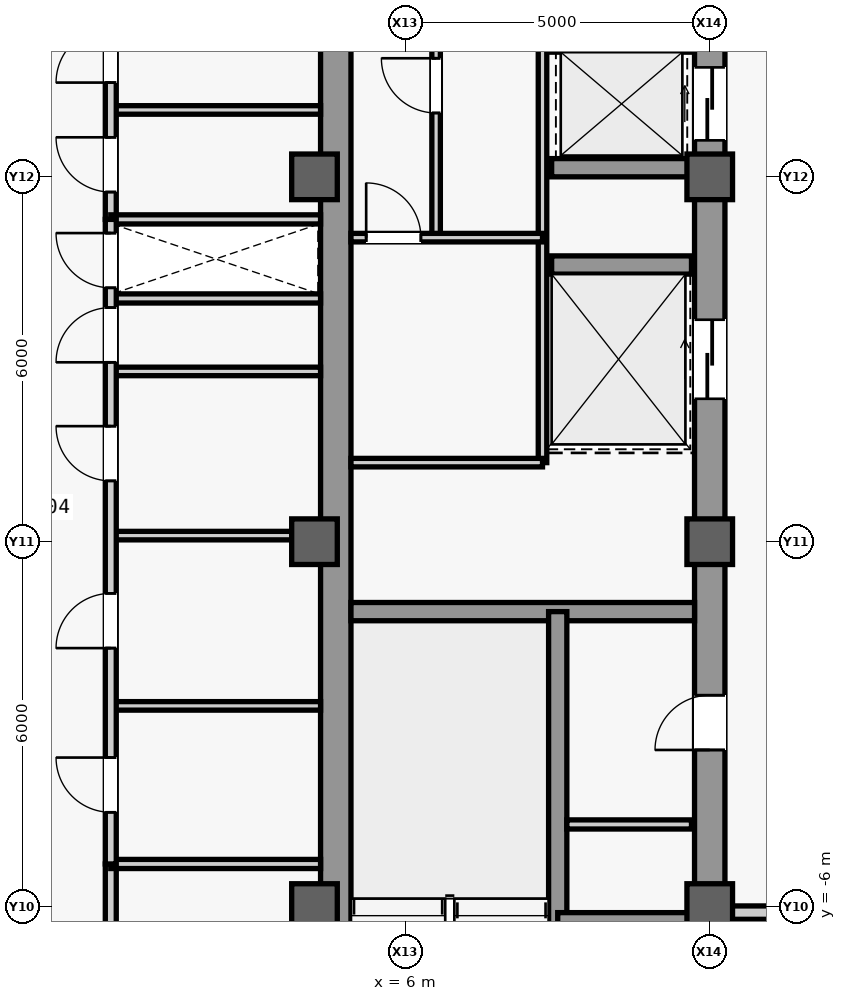
"""IFC4 building model, lengths in metres.
Left out: names, types, materials, properties, quantities, classifications, styles, units other than length and angle.
Written with IfcOpenShell. Run it as: python <this file> out.ifc"""

import sys

from ifc_helpers import new_model, si_unit, direction, frame, frame_2d, origin, origin_2d, place, context, subcontext, project, spatial, rectangle, extrude, source, transform, mapped, element, fill, save


model = new_model("IFC4")
c1 = context("Model", 3, precision=1e-05, world=origin(), true_north=direction((0.0, 1.0)))
c2 = subcontext(c1, "Body", "Model", "MODEL_VIEW")
j1 = project(units=[si_unit("LENGTHUNIT", "METRE"), si_unit("PLANEANGLEUNIT", "RADIAN")], contexts=[c1])
p1 = place(None, origin())
s1 = spatial("IfcSite", under=j1, at=p1, CompositionType="ELEMENT")
p2 = place(p1, origin())
s2 = spatial("IfcBuilding", under=s1, at=p2, CompositionType="ELEMENT")
p3 = place(p2, frame((0.0, 0.0, 289.5)))
s3 = spatial("IfcBuildingStorey", under=s2, at=p3, CompositionType="ELEMENT", Elevation=289.5)
m1 = source(origin(), c2, "Body", "SweptSolid", [
    extrude(rectangle(XDim=22.0, YDim=0.5, at=frame_2d((11.0, 0.0))), origin(), (0.0, 0.0, 1.0), 3.78),
])
p4 = place(p3, frame((11.0, -11.0, 0.0), z_axis=(0.0, 0.0, 1.0), x_axis=(0.0, 1.0, 0.0)))
e1 = element("IfcWall", 1, at=p4, inside=s3, PredefinedType="SHEAR", context=c2, shape_type="MappedRepresentation", body=[
    mapped(m1, transform((0.0, 0.0, 0.0), scale=1.0)),
])
m2 = source(origin(), c2, "Body", "SweptSolid", [
    extrude(rectangle(XDim=1.1, YDim=2.2, at=frame_2d((0.55, 1.1))), frame((0.0, 0.26, 0.0), z_axis=(0.0, -1.0, 0.0), x_axis=(1.0, 0.0, 0.0)), (0.0, 0.0, 1.0), 0.52),
])
p5 = place(p4, frame((0.8, 0.0, 0.0)))
e2 = element("IfcOpeningElement", 2, at=p5, cuts=e1, PredefinedType="OPENING", context=c2, shape_type="MappedRepresentation", body=[
    mapped(m2, transform((0.0, 0.0, 0.0), scale=1.0)),
])
m3 = source(origin(), c2, "Body", "SweptSolid", [
    extrude(rectangle(XDim=0.9, YDim=2.15, at=frame_2d((0.45, 1.075))), frame((0.0, 0.26, 0.0), z_axis=(0.0, -1.0, 0.0), x_axis=(1.0, 0.0, 0.0)), (0.0, 0.0, 1.0), 0.52),
])
p6 = place(p4, frame((7.575, 0.0, 0.0)))
e3 = element("IfcOpeningElement", 3, at=p6, cuts=e1, PredefinedType="OPENING", context=c2, shape_type="MappedRepresentation", body=[
    mapped(m3, transform((0.0, 0.0, 0.0), scale=1.0)),
])
m4 = source(origin(), c2, "Body", "SweptSolid", [
    extrude(rectangle(XDim=1.2, YDim=2.3, at=frame_2d((0.6, 1.15))), frame((0.0, 0.26, 0.0), z_axis=(0.0, -1.0, 0.0), x_axis=(1.0, 0.0, 0.0)), (0.0, 0.0, 1.0), 0.52),
])
p7 = place(p4, frame((17.6, 0.0, 0.0)))
e4 = element("IfcOpeningElement", 4, at=p7, cuts=e1, PredefinedType="OPENING", context=c2, shape_type="MappedRepresentation", body=[
    mapped(m4, transform((0.0, 0.0, 0.0), scale=1.0)),
])
p8 = place(p4, frame((19.6, 0.0, 0.0)))
e5 = element("IfcOpeningElement", 5, at=p8, cuts=e1, PredefinedType="OPENING", context=c2, shape_type="MappedRepresentation", body=[
    mapped(m4, transform((0.0, 0.0, 0.0), scale=1.0)),
])
m5 = source(origin(), c2, "Body", "SweptSolid", [
    extrude(rectangle(XDim=1.3, YDim=2.3, at=frame_2d((0.65, 1.15))), frame((0.0, 0.26, 0.0), z_axis=(0.0, -1.0, 0.0), x_axis=(1.0, 0.0, 0.0)), (0.0, 0.0, 1.0), 0.52),
])
p9 = place(p4, frame((2.7, 0.0, 0.0)))
e6 = element("IfcOpeningElement", 6, at=p9, cuts=e1, PredefinedType="OPENING", context=c2, shape_type="MappedRepresentation", body=[
    mapped(m5, transform((0.0, 0.0, 0.0), scale=1.0)),
])
p10 = place(p4, frame((13.35, 0.0, 0.0)))
e7 = element("IfcOpeningElement", 7, at=p10, cuts=e1, PredefinedType="OPENING", context=c2, shape_type="MappedRepresentation", body=[
    mapped(m5, transform((0.0, 0.0, 0.0), scale=1.0)),
])
m6 = source(origin(), c2, "Body", "SweptSolid", [
    extrude(rectangle(XDim=21.4, YDim=0.5, at=frame_2d((10.7, 0.0))), origin(), (0.0, 0.0, 1.0), 3.78),
])
p11 = place(p3, frame((4.85, -10.7, 0.0), z_axis=(0.0, 0.0, 1.0), x_axis=(0.0, 1.0, 0.0)))
e8 = element("IfcWall", 8, at=p11, inside=s3, PredefinedType="SHEAR", context=c2, shape_type="MappedRepresentation", body=[
    mapped(m6, transform((0.0, 0.0, 0.0), scale=1.0)),
])
m7 = source(origin(), c2, "Body", "SweptSolid", [
    extrude(rectangle(XDim=5.65, YDim=0.3, at=frame_2d((2.825, 0.0))), origin(), (0.0, 0.0, 1.0), 3.78),
])
p12 = place(p3, frame((5.1, -1.15, 0.0), z_axis=(0.0, 0.0, 1.0), x_axis=(1.0, 0.0, 0.0)))
e9 = element("IfcWall", 9, at=p12, inside=s3, PredefinedType="SHEAR", context=c2, shape_type="MappedRepresentation", body=[
    mapped(m7, transform((0.0, 0.0, 0.0), scale=1.0)),
])
m8 = source(origin(), c2, "Body", "SweptSolid", [
    extrude(rectangle(XDim=0.75, YDim=0.75, at=origin_2d()), origin(), (0.0, 0.0, 1.0), 4.0),
])
for number, where, z_axis, x_axis in (
    (10, (4.5, -6.0, 0.0), (0.0, 0.0, 1.0), (1.0, 0.0, 0.0)),
    (11, (4.5, 0.0, 0.0), (0.0, 0.0, 1.0), (1.0, 0.0, 0.0)),
    (12, (4.5, 6.0, 0.0), (0.0, 0.0, 1.0), (1.0, 0.0, 0.0)),
    (13, (11.0, -6.0, 0.0), (0.0, 0.0, 1.0), (1.0, 0.0, 0.0)),
    (14, (11.0, 0.0, 0.0), (0.0, 0.0, 1.0), (1.0, 0.0, 0.0)),
    (15, (11.0, 6.0, 0.0), (0.0, 0.0, 1.0), (1.0, 0.0, 0.0)),
):
    element("IfcColumn", number, at=place(p3, frame(where, z_axis=z_axis, x_axis=x_axis)), inside=s3, PredefinedType="COLUMN", context=c2, shape_type="MappedRepresentation", body=[
        mapped(m8, transform((0.0, 0.0, 0.0), scale=1.0)),
    ])
m9 = source(origin(), c2, "Body", "SweptSolid", [
    extrude(rectangle(XDim=7.8, YDim=0.3, at=frame_2d((3.9, 0.0))), origin(), (0.0, 0.0, 1.0), 3.78),
])
p13 = place(p3, frame((8.5, -8.95, 0.0), z_axis=(0.0, 0.0, 1.0), x_axis=(0.0, 1.0, 0.0)))
e16 = element("IfcWall", 16, at=p13, inside=s3, PredefinedType="SHEAR", context=c2, shape_type="MappedRepresentation", body=[
    mapped(m9, transform((0.0, 0.0, 0.0), scale=1.0)),
])
m10 = source(origin(), c2, "Body", "SweptSolid", [
    extrude(rectangle(XDim=2.2, YDim=0.3, at=frame_2d((1.1, 0.0))), origin(), (0.0, 0.0, 1.0), 3.78),
])
p14 = place(p3, frame((8.5, -6.25, 0.0), z_axis=(0.0, 0.0, 1.0), x_axis=(1.0, 0.0, 0.0)))
e17 = element("IfcWall", 17, at=p14, inside=s3, PredefinedType="SHEAR", context=c2, shape_type="MappedRepresentation", body=[
    mapped(m10, transform((0.0, 0.0, 0.0), scale=1.0)),
])
m11 = source(origin(), c2, "Body", "SweptSolid", [
    extrude(rectangle(XDim=2.3, YDim=0.3, at=frame_2d((1.15, 0.0))), origin(), (0.0, 0.0, 1.0), 3.78),
])
for number, where, z_axis, x_axis in (
    (18, (8.4, 4.55, 0.0), (0.0, 0.0, 1.0), (1.0, 0.0, 0.0)),
    (19, (8.4, 6.15, 0.0), (0.0, 0.0, 1.0), (1.0, 0.0, 0.0)),
    (20, (8.4, 8.2, 0.0), (0.0, 0.0, 1.0), (1.0, 0.0, 0.0)),
):
    element("IfcWall", number, at=place(p3, frame(where, z_axis=z_axis, x_axis=x_axis)), inside=s3, PredefinedType="SHEAR", context=c2, shape_type="MappedRepresentation", body=[
        mapped(m11, transform((0.0, 0.0, 0.0), scale=1.0)),
    ])
m12 = source(origin(), c2, "Body", "SweptSolid", [
    extrude(rectangle(XDim=2.05, YDim=0.15, at=frame_2d((1.025, 0.0))), origin(), (0.0, 0.0, 1.0), 3.78),
])
p15 = place(p3, frame((8.65, -4.65, 0.0), z_axis=(0.0, 0.0, 1.0), x_axis=(1.0, 0.0, 0.0)))
e21 = element("IfcWall", 21, at=p15, inside=s3, PredefinedType="PARTITIONING", context=c2, shape_type="MappedRepresentation", body=[
    mapped(m12, transform((0.0, 0.0, 0.0), scale=1.0)),
])
m13 = source(origin(), c2, "Body", "SweptSolid", [
    extrude(rectangle(XDim=9.4, YDim=0.14, at=frame_2d((4.7, 0.0))), origin(), (0.0, 0.0, 1.0), 3.78),
])
p16 = place(p3, frame((8.25, 1.3, 0.0), z_axis=(0.0, 0.0, 1.0), x_axis=(0.0, 1.0, 0.0)))
e22 = element("IfcWall", 22, at=p16, inside=s3, PredefinedType="PARTITIONING", context=c2, shape_type="MappedRepresentation", body=[
    mapped(m13, transform((0.0, 0.0, 0.0), scale=1.0)),
])
m14 = source(origin(), c2, "Body", "SweptSolid", [
    extrude(rectangle(XDim=3.15, YDim=0.14, at=frame_2d((1.575, 0.0))), origin(), (0.0, 0.0, 1.0), 3.78),
])
p17 = place(p3, frame((5.1, 1.3, 0.0), z_axis=(0.0, 0.0, 1.0), x_axis=(1.0, 0.0, 0.0)))
e23 = element("IfcWall", 23, at=p17, inside=s3, PredefinedType="PARTITIONING", context=c2, shape_type="MappedRepresentation", body=[
    mapped(m14, transform((0.0, 0.0, 0.0), scale=1.0)),
])
m15 = source(origin(), c2, "Body", "SweptSolid", [
    extrude(rectangle(XDim=5.7, YDim=0.14, at=frame_2d((2.85, 0.0))), origin(), (0.0, 0.0, 1.0), 3.78),
])
p18 = place(p3, frame((6.5, 5.0, 0.0), z_axis=(0.0, 0.0, 1.0), x_axis=(0.0, 1.0, 0.0)))
e24 = element("IfcWall", 24, at=p18, inside=s3, PredefinedType="PARTITIONING", context=c2, shape_type="MappedRepresentation", body=[
    mapped(m15, transform((0.0, 0.0, 0.0), scale=1.0)),
])
m16 = source(origin(), c2, "Body", "SweptSolid", [
    extrude(rectangle(XDim=0.9, YDim=2.15, at=frame_2d((0.45, 1.075))), frame((0.0, 0.08, 0.0), z_axis=(0.0, -1.0, 0.0), x_axis=(1.0, 0.0, 0.0)), (0.0, 0.0, 1.0), 0.16),
])
p19 = place(p18, frame((2.05, 0.0, 0.0)))
e25 = element("IfcOpeningElement", 25, at=p19, cuts=e24, PredefinedType="OPENING", context=c2, shape_type="MappedRepresentation", body=[
    mapped(m16, transform((0.0, 0.0, 0.0), scale=1.0)),
])
p20 = place(p3, frame((5.1, 5.0, 0.0), z_axis=(0.0, 0.0, 1.0), x_axis=(1.0, 0.0, 0.0)))
e26 = element("IfcWall", 26, at=p20, inside=s3, PredefinedType="PARTITIONING", context=c2, shape_type="MappedRepresentation", body=[
    mapped(m14, transform((0.0, 0.0, 0.0), scale=1.0)),
])
p21 = place(p20, frame((0.25, 0.0, 0.0)))
e27 = element("IfcOpeningElement", 27, at=p21, cuts=e26, PredefinedType="OPENING", context=c2, shape_type="MappedRepresentation", body=[
    mapped(m16, transform((0.0, 0.0, 0.0), scale=1.0)),
])
m17 = source(origin(), c2, "Body", "SweptSolid", [
    extrude(rectangle(XDim=4.05, YDim=0.22, at=frame_2d((2.025, 0.0))), origin(), (0.0, 0.0, 1.0), 3.085),
])
p22 = place(p3, frame((11.3, -6.1, 0.0), z_axis=(0.0, 0.0, 1.0), x_axis=(1.0, 0.0, 0.0)))
e28 = element("IfcWall", 28, at=p22, inside=s3, PredefinedType="PARTITIONING", context=c2, shape_type="MappedRepresentation", body=[
    mapped(m17, transform((0.0, 0.0, 0.0), scale=1.0)),
])
m18 = source(origin(), c2, "Body", "SweptSolid", [
    extrude(rectangle(XDim=3.45, YDim=0.15, at=frame_2d((1.725, 0.0))), origin(), (0.0, 0.0, 1.0), 3.78),
])
p23 = place(p3, frame((1.15, 4.0, 0.0), z_axis=(0.0, 0.0, 1.0), x_axis=(1.0, 0.0, 0.0)))
e29 = element("IfcWall", 29, at=p23, inside=s3, PredefinedType="PARTITIONING", context=c2, shape_type="MappedRepresentation", body=[
    mapped(m18, transform((0.0, 0.0, 0.0), scale=1.0)),
])
m19 = source(origin(), c2, "Body", "SweptSolid", [
    extrude(rectangle(XDim=5.4, YDim=0.18, at=frame_2d((2.7, 0.0))), origin(), (0.0, 0.0, 1.0), 3.78),
])
p24 = place(p3, frame((1.15, -10.7, 0.0), z_axis=(0.0, 0.0, 1.0), x_axis=(0.0, 1.0, 0.0)))
e30 = element("IfcWall", 30, at=p24, inside=s3, PredefinedType="PARTITIONING", context=c2, shape_type="MappedRepresentation", body=[
    mapped(m19, transform((0.0, 0.0, 0.0), scale=1.0)),
])
m20 = source(origin(), c2, "Body", "SweptSolid", [
    extrude(rectangle(XDim=0.9, YDim=2.15, at=frame_2d((0.45, 1.075))), frame((0.0, 0.1, 0.0), z_axis=(0.0, -1.0, 0.0), x_axis=(1.0, 0.0, 0.0)), (0.0, 0.0, 1.0), 0.2),
])
p25 = place(p24, frame((2.25, 0.0, 0.0)))
e31 = element("IfcOpeningElement", 31, at=p25, cuts=e30, PredefinedType="OPENING", context=c2, shape_type="MappedRepresentation", body=[
    mapped(m20, transform((0.0, 0.0, 0.0), scale=1.0)),
])
p26 = place(p3, frame((1.15, -5.3, 0.0), z_axis=(0.0, 0.0, 1.0), x_axis=(1.0, 0.0, 0.0)))
e32 = element("IfcWall", 32, at=p26, inside=s3, PredefinedType="PARTITIONING", context=c2, shape_type="MappedRepresentation", body=[
    mapped(m18, transform((0.0, 0.0, 0.0), scale=1.0)),
])
m21 = source(origin(), c2, "Body", "SweptSolid", [
    extrude(rectangle(XDim=3.45, YDim=0.14, at=frame_2d((1.725, 0.0))), origin(), (0.0, 0.0, 1.0), 3.78),
])
p27 = place(p3, frame((1.15, 7.1, 0.0), z_axis=(0.0, 0.0, 1.0), x_axis=(1.0, 0.0, 0.0)))
e33 = element("IfcWall", 33, at=p27, inside=s3, PredefinedType="PARTITIONING", context=c2, shape_type="MappedRepresentation", body=[
    mapped(m21, transform((0.0, 0.0, 0.0), scale=1.0)),
])
p28 = place(p3, frame((1.15, 5.3, 0.0), z_axis=(0.0, 0.0, 1.0), x_axis=(0.0, 1.0, 0.0)))
e34 = element("IfcWall", 34, at=p28, inside=s3, PredefinedType="PARTITIONING", context=c2, shape_type="MappedRepresentation", body=[
    mapped(m19, transform((0.0, 0.0, 0.0), scale=1.0)),
])
p29 = place(p28, frame((0.45, 0.0, 0.0)))
e35 = element("IfcOpeningElement", 35, at=p29, cuts=e34, PredefinedType="OPENING", context=c2, shape_type="MappedRepresentation", body=[
    mapped(m20, transform((0.0, 0.0, 0.0), scale=1.0)),
])
p30 = place(p28, frame((2.25, 0.0, 0.0)))
e36 = element("IfcOpeningElement", 36, at=p30, cuts=e34, PredefinedType="OPENING", context=c2, shape_type="MappedRepresentation", body=[
    mapped(m20, transform((0.0, 0.0, 0.0), scale=1.0)),
])
p31 = place(p28, frame((4.05, 0.0, 0.0)))
e37 = element("IfcOpeningElement", 37, at=p31, cuts=e34, PredefinedType="OPENING", context=c2, shape_type="MappedRepresentation", body=[
    mapped(m20, transform((0.0, 0.0, 0.0), scale=1.0)),
])
p32 = place(p3, frame((1.15, 5.3, 0.0), z_axis=(0.0, 0.0, 1.0), x_axis=(1.0, 0.0, 0.0)))
e38 = element("IfcWall", 38, at=p32, inside=s3, PredefinedType="PARTITIONING", context=c2, shape_type="MappedRepresentation", body=[
    mapped(m18, transform((0.0, 0.0, 0.0), scale=1.0)),
])
p33 = place(p3, frame((1.15, -2.7, 0.0), z_axis=(0.0, 0.0, 1.0), x_axis=(1.0, 0.0, 0.0)))
e39 = element("IfcWall", 39, at=p33, inside=s3, PredefinedType="PARTITIONING", context=c2, shape_type="MappedRepresentation", body=[
    mapped(m21, transform((0.0, 0.0, 0.0), scale=1.0)),
])
m22 = source(origin(), c2, "Body", "SweptSolid", [
    extrude(rectangle(XDim=3.45, YDim=0.14, at=frame_2d((1.725, 0.0))), origin(), (0.0, 0.0, 1.0), 3.085),
])
p34 = place(p3, frame((1.15, 0.1, 0.0), z_axis=(0.0, 0.0, 1.0), x_axis=(1.0, 0.0, 0.0)))
e40 = element("IfcWall", 40, at=p34, inside=s3, PredefinedType="PARTITIONING", context=c2, shape_type="MappedRepresentation", body=[
    mapped(m22, transform((0.0, 0.0, 0.0), scale=1.0)),
])
p35 = place(p3, frame((1.15, 2.8, 0.0), z_axis=(0.0, 0.0, 1.0), x_axis=(1.0, 0.0, 0.0)))
e41 = element("IfcWall", 41, at=p35, inside=s3, PredefinedType="PARTITIONING", context=c2, shape_type="MappedRepresentation", body=[
    mapped(m21, transform((0.0, 0.0, 0.0), scale=1.0)),
])
m23 = source(origin(), c2, "Body", "SweptSolid", [
    extrude(rectangle(XDim=10.6, YDim=0.18, at=frame_2d((5.3, 0.0))), origin(), (0.0, 0.0, 1.0), 3.78),
])
p36 = place(p3, frame((1.15, -5.3, 0.0), z_axis=(0.0, 0.0, 1.0), x_axis=(0.0, 1.0, 0.0)))
e42 = element("IfcWall", 42, at=p36, inside=s3, PredefinedType="PARTITIONING", context=c2, shape_type="MappedRepresentation", body=[
    mapped(m23, transform((0.0, 0.0, 0.0), scale=1.0)),
])
p37 = place(p36, frame((0.85, 0.0, 0.0)))
e43 = element("IfcOpeningElement", 43, at=p37, cuts=e42, PredefinedType="OPENING", context=c2, shape_type="MappedRepresentation", body=[
    mapped(m20, transform((0.0, 0.0, 0.0), scale=1.0)),
])
p38 = place(p36, frame((3.55, 0.0, 0.0)))
e44 = element("IfcOpeningElement", 44, at=p38, cuts=e42, PredefinedType="OPENING", context=c2, shape_type="MappedRepresentation", body=[
    mapped(m20, transform((0.0, 0.0, 0.0), scale=1.0)),
])
p39 = place(p36, frame((6.3, 0.0, 0.0)))
e45 = element("IfcOpeningElement", 45, at=p39, cuts=e42, PredefinedType="OPENING", context=c2, shape_type="MappedRepresentation", body=[
    mapped(m20, transform((0.0, 0.0, 0.0), scale=1.0)),
])
p40 = place(p36, frame((8.25, 0.0, 0.0)))
e46 = element("IfcOpeningElement", 46, at=p40, cuts=e42, PredefinedType="OPENING", context=c2, shape_type="MappedRepresentation", body=[
    mapped(m20, transform((0.0, 0.0, 0.0), scale=1.0)),
])
p41 = place(p36, frame((9.475, 0.0, 0.0)))
e47 = element("IfcOpeningElement", 47, at=p41, cuts=e42, PredefinedType="OPENING", context=c2, shape_type="MappedRepresentation", body=[
    mapped(m20, transform((0.0, 0.0, 0.0), scale=1.0)),
])
m24 = source(origin(), c2, "Body", "SweptSolid", [
    extrude(rectangle(XDim=0.9, YDim=2.15, at=frame_2d((0.45, 1.075))), frame((0.0, 0.025, 0.0), z_axis=(0.0, -1.0, 0.0), x_axis=(1.0, 0.0, 0.0)), (0.0, 0.0, 1.0), 0.05),
])
p42 = place(p6, origin())
e48 = element("IfcDoor", 48, at=p42, inside=s3, OperationType="SINGLE_SWING_LEFT", PredefinedType="DOOR", context=c2, shape_type="MappedRepresentation", body=[
    mapped(m24, transform((0.0, 0.0, 0.0), scale=1.0)),
])
fill(e3, e48)
p43 = place(p19, origin())
e49 = element("IfcDoor", 49, at=p43, inside=s3, OperationType="SINGLE_SWING_RIGHT", PredefinedType="DOOR", context=c2, shape_type="MappedRepresentation", body=[
    mapped(m24, transform((0.0, 0.0, 0.0), scale=1.0)),
])
fill(e25, e49)
p44 = place(p21, origin())
e50 = element("IfcDoor", 50, at=p44, inside=s3, OperationType="SINGLE_SWING_LEFT", PredefinedType="DOOR", context=c2, shape_type="MappedRepresentation", body=[
    mapped(m24, transform((0.0, 0.0, 0.0), scale=1.0)),
])
fill(e27, e50)
p45 = place(p29, origin())
e51 = element("IfcDoor", 51, at=p45, inside=s3, OperationType="SINGLE_SWING_RIGHT", PredefinedType="DOOR", context=c2, shape_type="MappedRepresentation", body=[
    mapped(m24, transform((0.0, 0.0, 0.0), scale=1.0)),
])
fill(e35, e51)
p46 = place(p30, origin())
e52 = element("IfcDoor", 52, at=p46, inside=s3, OperationType="SINGLE_SWING_LEFT", PredefinedType="DOOR", context=c2, shape_type="MappedRepresentation", body=[
    mapped(m24, transform((0.0, 0.0, 0.0), scale=1.0)),
])
fill(e36, e52)
p47 = place(p37, origin())
e53 = element("IfcDoor", 53, at=p47, inside=s3, OperationType="SINGLE_SWING_RIGHT", PredefinedType="DOOR", context=c2, shape_type="MappedRepresentation", body=[
    mapped(m24, transform((0.0, 0.0, 0.0), scale=1.0)),
])
fill(e43, e53)
p48 = place(p38, origin())
e54 = element("IfcDoor", 54, at=p48, inside=s3, OperationType="SINGLE_SWING_LEFT", PredefinedType="DOOR", context=c2, shape_type="MappedRepresentation", body=[
    mapped(m24, transform((0.0, 0.0, 0.0), scale=1.0)),
])
fill(e44, e54)
p49 = place(p39, origin())
e55 = element("IfcDoor", 55, at=p49, inside=s3, OperationType="SINGLE_SWING_RIGHT", PredefinedType="DOOR", context=c2, shape_type="MappedRepresentation", body=[
    mapped(m24, transform((0.0, 0.0, 0.0), scale=1.0)),
])
fill(e45, e55)
p50 = place(p40, origin())
e56 = element("IfcDoor", 56, at=p50, inside=s3, OperationType="SINGLE_SWING_LEFT", PredefinedType="DOOR", context=c2, shape_type="MappedRepresentation", body=[
    mapped(m24, transform((0.0, 0.0, 0.0), scale=1.0)),
])
fill(e46, e56)
p51 = place(p41, origin())
e57 = element("IfcDoor", 57, at=p51, inside=s3, OperationType="SINGLE_SWING_RIGHT", PredefinedType="DOOR", context=c2, shape_type="MappedRepresentation", body=[
    mapped(m24, transform((0.0, 0.0, 0.0), scale=1.0)),
])
fill(e47, e57)
m25 = source(origin(), c2, "Body", "SweptSolid", [
    extrude(rectangle(XDim=1.2, YDim=2.3, at=frame_2d((0.6, 1.15))), frame((0.0, 0.025, 0.0), z_axis=(0.0, -1.0, 0.0), x_axis=(1.0, 0.0, 0.0)), (0.0, 0.0, 1.0), 0.05),
])
p52 = place(p7, origin())
e58 = element("IfcDoor", 58, at=p52, inside=s3, OperationType="SLIDING_TO_LEFT", PredefinedType="DOOR", context=c2, shape_type="MappedRepresentation", body=[
    mapped(m25, transform((0.0, 0.0, 0.0), scale=1.0)),
])
fill(e4, e58)
m26 = source(origin(), c2, "Body", "SweptSolid", [
    extrude(rectangle(XDim=1.3, YDim=2.3, at=frame_2d((0.65, 1.15))), frame((0.0, 0.025, 0.0), z_axis=(0.0, -1.0, 0.0), x_axis=(1.0, 0.0, 0.0)), (0.0, 0.0, 1.0), 0.05),
])
p53 = place(p10, origin())
e59 = element("IfcDoor", 59, at=p53, inside=s3, OperationType="SLIDING_TO_LEFT", PredefinedType="DOOR", context=c2, shape_type="MappedRepresentation", body=[
    mapped(m26, transform((0.0, 0.0, 0.0), scale=1.0)),
])
fill(e7, e59)
save(model, sys.argv[1])
